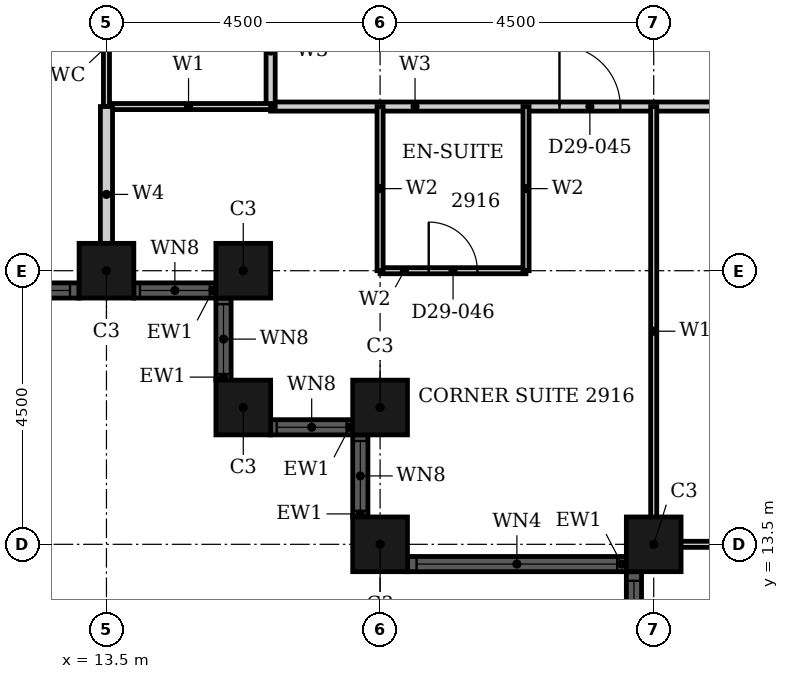
"""IFC4 building model, lengths in metres.
Left out: names, types, materials, properties, quantities, classifications, styles, units other than length and angle.
Written with IfcOpenShell. Run it as: python <this file> out.ifc"""

import sys

from ifc_helpers import new_model, si_unit, direction, frame, frame_2d, origin, origin_2d, place, context, subcontext, project, spatial, rectangle, hollow_rectangle, extrude, element, fill, save


model = new_model("IFC4")
c1 = context("Model", 3, precision=1e-05, world=origin(), true_north=direction((0.0, 1.0)))
c2 = subcontext(c1, "Body", "Model", "MODEL_VIEW")
j1 = project(units=[si_unit("LENGTHUNIT", "METRE"), si_unit("PLANEANGLEUNIT", "RADIAN")], contexts=[c1])
p1 = place(None, origin())
s1 = spatial("IfcSite", under=j1, at=p1, CompositionType="ELEMENT")
p2 = place(p1, origin())
s2 = spatial("IfcBuilding", under=s1, at=p2, CompositionType="ELEMENT")
p3 = place(p2, frame((0.0, 0.0, 118.8)))
s3 = spatial("IfcBuildingStorey", under=s2, at=p3, CompositionType="ELEMENT", Elevation=118.8)
for number, where, z_axis, x_axis in (
    (1, (13.5, 18.0, 0.0), (0.0, 0.0, 1.0), (1.0, 0.0, 0.0)),
    (2, (15.75, 18.0, 0.0), (0.0, 0.0, 1.0), (1.0, 0.0, 0.0)),
    (3, (15.75, 15.75, 0.0), (0.0, 0.0, 1.0), (1.0, 0.0, 0.0)),
    (4, (18.0, 15.75, 0.0), (0.0, 0.0, 1.0), (1.0, 0.0, 0.0)),
    (5, (18.0, 13.5, 0.0), (0.0, 0.0, 1.0), (1.0, 0.0, 0.0)),
    (6, (22.5, 13.5, 0.0), (0.0, 0.0, 1.0), (1.0, 0.0, 0.0)),
):
    element("IfcColumn", number, at=place(p3, frame(where, z_axis=z_axis, x_axis=x_axis)), inside=s3, PredefinedType="COLUMN", context=c2, shape_type="SweptSolid", body=[
        extrude(hollow_rectangle(XDim=0.9, YDim=0.9, WallThickness=0.028, at=origin_2d()), origin(), (0.0, 0.0, 1.0), 3.6),
    ])
p4 = place(p3, frame((4.95, 17.675, 0.0), z_axis=(0.0, 0.0, 1.0), x_axis=(1.0, 0.0, 0.0)))
e7 = element("IfcWall", 7, at=p4, inside=s3, PredefinedType="SOLIDWALL", context=c2, shape_type="SweptSolid", body=[
    extrude(rectangle(XDim=8.1, YDim=0.25, at=frame_2d((4.05, 0.0))), origin(), (0.0, 0.0, 1.0), 3.6),
])
p5 = place(p4, frame((0.15, 0.0, 0.9)))
e8 = element("IfcOpeningElement", 8, at=p5, cuts=e7, PredefinedType="OPENING", context=c2, shape_type="SweptSolid", body=[
    extrude(rectangle(XDim=3.3, YDim=2.08, at=frame_2d((1.65, 1.04))), frame((0.0, 0.135, 0.0), z_axis=(0.0, -1.0, 0.0), x_axis=(1.0, 0.0, 0.0)), (0.0, 0.0, 1.0), 0.27),
])
p6 = place(p4, frame((4.65, 0.0, 0.9)))
e9 = element("IfcOpeningElement", 9, at=p6, cuts=e7, PredefinedType="OPENING", context=c2, shape_type="SweptSolid", body=[
    extrude(rectangle(XDim=3.3, YDim=2.08, at=frame_2d((1.65, 1.04))), frame((0.0, 0.135, 0.0), z_axis=(0.0, -1.0, 0.0), x_axis=(1.0, 0.0, 0.0)), (0.0, 0.0, 1.0), 0.27),
])
p7 = place(p3, frame((13.95, 17.675, 0.0), z_axis=(0.0, 0.0, 1.0), x_axis=(1.0, 0.0, 0.0)))
e10 = element("IfcWall", 10, at=p7, inside=s3, PredefinedType="SOLIDWALL", context=c2, shape_type="SweptSolid", body=[
    extrude(rectangle(XDim=1.35, YDim=0.25, at=frame_2d((0.675, 0.0))), origin(), (0.0, 0.0, 1.0), 3.6),
])
p8 = place(p7, frame((0.1, 0.0, 0.9)))
e11 = element("IfcOpeningElement", 11, at=p8, cuts=e10, PredefinedType="OPENING", context=c2, shape_type="SweptSolid", body=[
    extrude(rectangle(XDim=1.15, YDim=2.08, at=frame_2d((0.575, 1.04))), frame((0.0, 0.135, 0.0), z_axis=(0.0, -1.0, 0.0), x_axis=(1.0, 0.0, 0.0)), (0.0, 0.0, 1.0), 0.27),
])
p9 = place(p3, frame((15.425, 17.55, 0.0), z_axis=(0.0, 0.0, 1.0), x_axis=(0.0, -1.0, 0.0)))
e12 = element("IfcWall", 12, at=p9, inside=s3, PredefinedType="SOLIDWALL", context=c2, shape_type="SweptSolid", body=[
    extrude(rectangle(XDim=1.35, YDim=0.25, at=frame_2d((0.675, 0.0))), origin(), (0.0, 0.0, 1.0), 3.6),
])
p10 = place(p9, frame((0.1, 0.0, 0.9)))
e13 = element("IfcOpeningElement", 13, at=p10, cuts=e12, PredefinedType="OPENING", context=c2, shape_type="SweptSolid", body=[
    extrude(rectangle(XDim=1.15, YDim=2.08, at=frame_2d((0.575, 1.04))), frame((0.0, 0.135, 0.0), z_axis=(0.0, -1.0, 0.0), x_axis=(1.0, 0.0, 0.0)), (0.0, 0.0, 1.0), 0.27),
])
p11 = place(p3, frame((16.2, 15.425, 0.0), z_axis=(0.0, 0.0, 1.0), x_axis=(1.0, 0.0, 0.0)))
e14 = element("IfcWall", 14, at=p11, inside=s3, PredefinedType="SOLIDWALL", context=c2, shape_type="SweptSolid", body=[
    extrude(rectangle(XDim=1.35, YDim=0.25, at=frame_2d((0.675, 0.0))), origin(), (0.0, 0.0, 1.0), 3.6),
])
p12 = place(p11, frame((0.1, 0.0, 0.9)))
e15 = element("IfcOpeningElement", 15, at=p12, cuts=e14, PredefinedType="OPENING", context=c2, shape_type="SweptSolid", body=[
    extrude(rectangle(XDim=1.15, YDim=2.08, at=frame_2d((0.575, 1.04))), frame((0.0, 0.135, 0.0), z_axis=(0.0, -1.0, 0.0), x_axis=(1.0, 0.0, 0.0)), (0.0, 0.0, 1.0), 0.27),
])
p13 = place(p3, frame((17.675, 15.3, 0.0), z_axis=(0.0, 0.0, 1.0), x_axis=(0.0, -1.0, 0.0)))
e16 = element("IfcWall", 16, at=p13, inside=s3, PredefinedType="SOLIDWALL", context=c2, shape_type="SweptSolid", body=[
    extrude(rectangle(XDim=1.35, YDim=0.25, at=frame_2d((0.675, 0.0))), origin(), (0.0, 0.0, 1.0), 3.6),
])
p14 = place(p13, frame((0.1, 0.0, 0.9)))
e17 = element("IfcOpeningElement", 17, at=p14, cuts=e16, PredefinedType="OPENING", context=c2, shape_type="SweptSolid", body=[
    extrude(rectangle(XDim=1.15, YDim=2.08, at=frame_2d((0.575, 1.04))), frame((0.0, 0.135, 0.0), z_axis=(0.0, -1.0, 0.0), x_axis=(1.0, 0.0, 0.0)), (0.0, 0.0, 1.0), 0.27),
])
p15 = place(p3, frame((18.45, 13.175, 0.0), z_axis=(0.0, 0.0, 1.0), x_axis=(1.0, 0.0, 0.0)))
e18 = element("IfcWall", 18, at=p15, inside=s3, PredefinedType="SOLIDWALL", context=c2, shape_type="SweptSolid", body=[
    extrude(rectangle(XDim=3.6, YDim=0.25, at=frame_2d((1.8, 0.0))), origin(), (0.0, 0.0, 1.0), 3.6),
])
p16 = place(p15, frame((0.15, 0.0, 0.9)))
e19 = element("IfcOpeningElement", 19, at=p16, cuts=e18, PredefinedType="OPENING", context=c2, shape_type="SweptSolid", body=[
    extrude(rectangle(XDim=3.3, YDim=2.08, at=frame_2d((1.65, 1.04))), frame((0.0, 0.135, 0.0), z_axis=(0.0, -1.0, 0.0), x_axis=(1.0, 0.0, 0.0)), (0.0, 0.0, 1.0), 0.27),
])
p17 = place(p3, frame((22.175, 13.05, 0.0), z_axis=(0.0, 0.0, 1.0), x_axis=(0.0, -1.0, 0.0)))
e20 = element("IfcWall", 20, at=p17, inside=s3, PredefinedType="SOLIDWALL", context=c2, shape_type="SweptSolid", body=[
    extrude(rectangle(XDim=8.1, YDim=0.25, at=frame_2d((4.05, 0.0))), origin(), (0.0, 0.0, 1.0), 3.6),
])
p18 = place(p17, frame((0.15, 0.0, 0.9)))
e21 = element("IfcOpeningElement", 21, at=p18, cuts=e20, PredefinedType="OPENING", context=c2, shape_type="SweptSolid", body=[
    extrude(rectangle(XDim=3.3, YDim=2.08, at=frame_2d((1.65, 1.04))), frame((0.0, 0.135, 0.0), z_axis=(0.0, -1.0, 0.0), x_axis=(1.0, 0.0, 0.0)), (0.0, 0.0, 1.0), 0.27),
])
p19 = place(p17, frame((4.65, 0.0, 0.9)))
e22 = element("IfcOpeningElement", 22, at=p19, cuts=e20, PredefinedType="OPENING", context=c2, shape_type="SweptSolid", body=[
    extrude(rectangle(XDim=3.3, YDim=2.08, at=frame_2d((1.65, 1.04))), frame((0.0, 0.135, 0.0), z_axis=(0.0, -1.0, 0.0), x_axis=(1.0, 0.0, 0.0)), (0.0, 0.0, 1.0), 0.27),
])
p20 = place(p3, frame((16.2, 20.7, 0.0), z_axis=(0.0, 0.0, 1.0), x_axis=(1.0, 0.0, 0.0)))
e23 = element("IfcWall", 23, at=p20, inside=s3, PredefinedType="PARTITIONING", context=c2, shape_type="SweptSolid", body=[
    extrude(rectangle(XDim=13.5, YDim=0.15, at=frame_2d((6.75, 0.0))), origin(), (0.0, 0.0, 1.0), 3.3),
])
p21 = place(p20, frame((4.75, 0.0, 0.0)))
e24 = element("IfcOpeningElement", 24, at=p21, cuts=e23, PredefinedType="OPENING", context=c2, shape_type="SweptSolid", body=[
    extrude(rectangle(XDim=1.0, YDim=2.1, at=frame_2d((0.5, 1.05))), frame((0.0, 0.085, 0.0), z_axis=(0.0, -1.0, 0.0), x_axis=(1.0, 0.0, 0.0)), (0.0, 0.0, 1.0), 0.17),
])
p22 = place(p20, frame((9.45, 0.0, 0.0)))
e25 = element("IfcOpeningElement", 25, at=p22, cuts=e23, PredefinedType="OPENING", context=c2, shape_type="SweptSolid", body=[
    extrude(rectangle(XDim=0.9, YDim=2.1, at=frame_2d((0.45, 1.05))), frame((0.0, 0.085, 0.0), z_axis=(0.0, -1.0, 0.0), x_axis=(1.0, 0.0, 0.0)), (0.0, 0.0, 1.0), 0.17),
])
p23 = place(p3, frame((16.2, 20.7, 0.0), z_axis=(0.0, 0.0, 1.0), x_axis=(0.0, 1.0, 0.0)))
e26 = element("IfcWall", 26, at=p23, inside=s3, PredefinedType="PARTITIONING", context=c2, shape_type="SweptSolid", body=[
    extrude(rectangle(XDim=4.5, YDim=0.15, at=frame_2d((2.25, 0.0))), origin(), (0.0, 0.0, 1.0), 3.3),
])
p24 = place(p23, frame((1.825, 0.0, 0.0)))
e27 = element("IfcOpeningElement", 27, at=p24, cuts=e26, PredefinedType="OPENING", context=c2, shape_type="SweptSolid", body=[
    extrude(rectangle(XDim=0.95, YDim=2.1, at=frame_2d((0.475, 1.05))), frame((0.0, 0.085, 0.0), z_axis=(0.0, -1.0, 0.0), x_axis=(1.0, 0.0, 0.0)), (0.0, 0.0, 1.0), 0.17),
])
p25 = place(p3, frame((22.31, 13.5, 0.0), z_axis=(0.0, 0.0, 1.0), x_axis=(1.0, 0.0, 0.0)))
e28 = element("IfcWall", 28, at=p25, inside=s3, PredefinedType="PARTITIONING", context=c2, shape_type="SweptSolid", body=[
    extrude(rectangle(XDim=7.39, YDim=0.1, at=frame_2d((3.695, 0.0))), origin(), (0.0, 0.0, 1.0), 2.38),
])
p26 = place(p3, frame((13.5, 20.7, 0.0), z_axis=(0.0, 0.0, 1.0), x_axis=(1.0, 0.0, 0.0)))
e29 = element("IfcWall", 29, at=p26, inside=s3, PredefinedType="PARTITIONING", context=c2, shape_type="SweptSolid", body=[
    extrude(rectangle(XDim=2.7, YDim=0.1, at=frame_2d((1.35, 0.0))), origin(), (0.0, 0.0, 1.0), 3.3),
])
p27 = place(p3, frame((13.5, 20.7, 0.0), z_axis=(0.0, 0.0, 1.0), x_axis=(0.0, 1.0, 0.0)))
e30 = element("IfcWall", 30, at=p27, inside=s3, PredefinedType="PARTITIONING", context=c2, shape_type="SweptSolid", body=[
    extrude(rectangle(XDim=4.5, YDim=0.1, at=frame_2d((2.25, 0.0))), origin(), (0.0, 0.0, 1.0), 2.38),
])
p28 = place(p3, frame((22.5, 13.31, 0.0), z_axis=(0.0, 0.0, 1.0), x_axis=(0.0, 1.0, 0.0)))
e31 = element("IfcWall", 31, at=p28, inside=s3, PredefinedType="PARTITIONING", context=c2, shape_type="SweptSolid", body=[
    extrude(rectangle(XDim=7.39, YDim=0.1, at=frame_2d((3.695, 0.0))), origin(), (0.0, 0.0, 1.0), 3.3),
])
p29 = place(p3, frame((13.5, 17.81, 0.0), z_axis=(0.0, 0.0, 1.0), x_axis=(0.0, 1.0, 0.0)))
e32 = element("IfcWall", 32, at=p29, inside=s3, PredefinedType="PARTITIONING", context=c2, shape_type="SweptSolid", body=[
    extrude(rectangle(XDim=2.89, YDim=0.2, at=frame_2d((1.445, 0.0))), origin(), (0.0, 0.0, 1.0), 2.38),
])
p30 = place(p3, frame((18.0, 18.0, 0.0), z_axis=(0.0, 0.0, 1.0), x_axis=(1.0, 0.0, 0.0)))
e33 = element("IfcWall", 33, at=p30, inside=s3, PredefinedType="PARTITIONING", context=c2, shape_type="SweptSolid", body=[
    extrude(rectangle(XDim=2.4, YDim=0.1, at=frame_2d((1.2, 0.0))), origin(), (0.0, 0.0, 1.0), 3.3),
])
p31 = place(p30, frame((0.8, 0.0, 0.0)))
e34 = element("IfcOpeningElement", 34, at=p31, cuts=e33, PredefinedType="OPENING", context=c2, shape_type="SweptSolid", body=[
    extrude(rectangle(XDim=0.8, YDim=2.1, at=frame_2d((0.4, 1.05))), frame((0.0, 0.06, 0.0), z_axis=(0.0, -1.0, 0.0), x_axis=(1.0, 0.0, 0.0)), (0.0, 0.0, 1.0), 0.12),
])
for number, where, z_axis, x_axis in (
    (35, (18.0, 18.0, 0.0), (0.0, 0.0, 1.0), (0.0, 1.0, 0.0)),
    (36, (20.4, 18.0, 0.0), (0.0, 0.0, 1.0), (0.0, 1.0, 0.0)),
):
    element("IfcWall", number, at=place(p3, frame(where, z_axis=z_axis, x_axis=x_axis)), inside=s3, PredefinedType="PARTITIONING", context=c2, shape_type="SweptSolid", body=[
        extrude(rectangle(XDim=2.7, YDim=0.1, at=frame_2d((1.35, 0.0))), origin(), (0.0, 0.0, 1.0), 3.3),
    ])
p32 = place(p6, origin())
e37 = element("IfcWindow", 37, at=p32, inside=s3, PartitioningType="SINGLE_PANEL", PredefinedType="WINDOW", context=c2, shape_type="SweptSolid", body=[
    extrude(rectangle(XDim=3.3, YDim=2.08, at=frame_2d((1.65, 1.04))), frame((0.0, 0.03, 0.0), z_axis=(0.0, -1.0, 0.0), x_axis=(1.0, 0.0, 0.0)), (0.0, 0.0, 1.0), 0.06),
])
fill(e9, e37)
p33 = place(p8, origin())
e38 = element("IfcWindow", 38, at=p33, inside=s3, PartitioningType="SINGLE_PANEL", PredefinedType="WINDOW", context=c2, shape_type="SweptSolid", body=[
    extrude(rectangle(XDim=1.15, YDim=2.08, at=frame_2d((0.575, 1.04))), frame((0.0, 0.03, 0.0), z_axis=(0.0, -1.0, 0.0), x_axis=(1.0, 0.0, 0.0)), (0.0, 0.0, 1.0), 0.06),
])
fill(e11, e38)
p34 = place(p10, origin())
e39 = element("IfcWindow", 39, at=p34, inside=s3, PartitioningType="SINGLE_PANEL", PredefinedType="WINDOW", context=c2, shape_type="SweptSolid", body=[
    extrude(rectangle(XDim=1.15, YDim=2.08, at=frame_2d((0.575, 1.04))), frame((0.0, 0.03, 0.0), z_axis=(0.0, -1.0, 0.0), x_axis=(1.0, 0.0, 0.0)), (0.0, 0.0, 1.0), 0.06),
])
fill(e13, e39)
p35 = place(p12, origin())
e40 = element("IfcWindow", 40, at=p35, inside=s3, PartitioningType="SINGLE_PANEL", PredefinedType="WINDOW", context=c2, shape_type="SweptSolid", body=[
    extrude(rectangle(XDim=1.15, YDim=2.08, at=frame_2d((0.575, 1.04))), frame((0.0, 0.03, 0.0), z_axis=(0.0, -1.0, 0.0), x_axis=(1.0, 0.0, 0.0)), (0.0, 0.0, 1.0), 0.06),
])
fill(e15, e40)
p36 = place(p14, origin())
e41 = element("IfcWindow", 41, at=p36, inside=s3, PartitioningType="SINGLE_PANEL", PredefinedType="WINDOW", context=c2, shape_type="SweptSolid", body=[
    extrude(rectangle(XDim=1.15, YDim=2.08, at=frame_2d((0.575, 1.04))), frame((0.0, 0.03, 0.0), z_axis=(0.0, -1.0, 0.0), x_axis=(1.0, 0.0, 0.0)), (0.0, 0.0, 1.0), 0.06),
])
fill(e17, e41)
p37 = place(p16, origin())
e42 = element("IfcWindow", 42, at=p37, inside=s3, PartitioningType="SINGLE_PANEL", PredefinedType="WINDOW", context=c2, shape_type="SweptSolid", body=[
    extrude(rectangle(XDim=3.3, YDim=2.08, at=frame_2d((1.65, 1.04))), frame((0.0, 0.03, 0.0), z_axis=(0.0, -1.0, 0.0), x_axis=(1.0, 0.0, 0.0)), (0.0, 0.0, 1.0), 0.06),
])
fill(e19, e42)
p38 = place(p18, origin())
e43 = element("IfcWindow", 43, at=p38, inside=s3, PartitioningType="SINGLE_PANEL", PredefinedType="WINDOW", context=c2, shape_type="SweptSolid", body=[
    extrude(rectangle(XDim=3.3, YDim=2.08, at=frame_2d((1.65, 1.04))), frame((0.0, 0.03, 0.0), z_axis=(0.0, -1.0, 0.0), x_axis=(1.0, 0.0, 0.0)), (0.0, 0.0, 1.0), 0.06),
])
fill(e21, e43)
p39 = place(p21, origin())
e44 = element("IfcDoor", 44, at=p39, inside=s3, OperationType="SINGLE_SWING_RIGHT", PredefinedType="DOOR", context=c2, shape_type="SweptSolid", body=[
    extrude(rectangle(XDim=1.0, YDim=2.1, at=frame_2d((0.5, 1.05))), frame((0.0, 0.025, 0.0), z_axis=(0.0, -1.0, 0.0), x_axis=(1.0, 0.0, 0.0)), (0.0, 0.0, 1.0), 0.05),
])
fill(e24, e44)
p40 = place(p31, origin())
e45 = element("IfcDoor", 45, at=p40, inside=s3, OperationType="SINGLE_SWING_LEFT", PredefinedType="DOOR", context=c2, shape_type="SweptSolid", body=[
    extrude(rectangle(XDim=0.8, YDim=2.1, at=frame_2d((0.4, 1.05))), frame((0.0, 0.025, 0.0), z_axis=(0.0, -1.0, 0.0), x_axis=(1.0, 0.0, 0.0)), (0.0, 0.0, 1.0), 0.05),
])
fill(e34, e45)
save(model, sys.argv[1])
